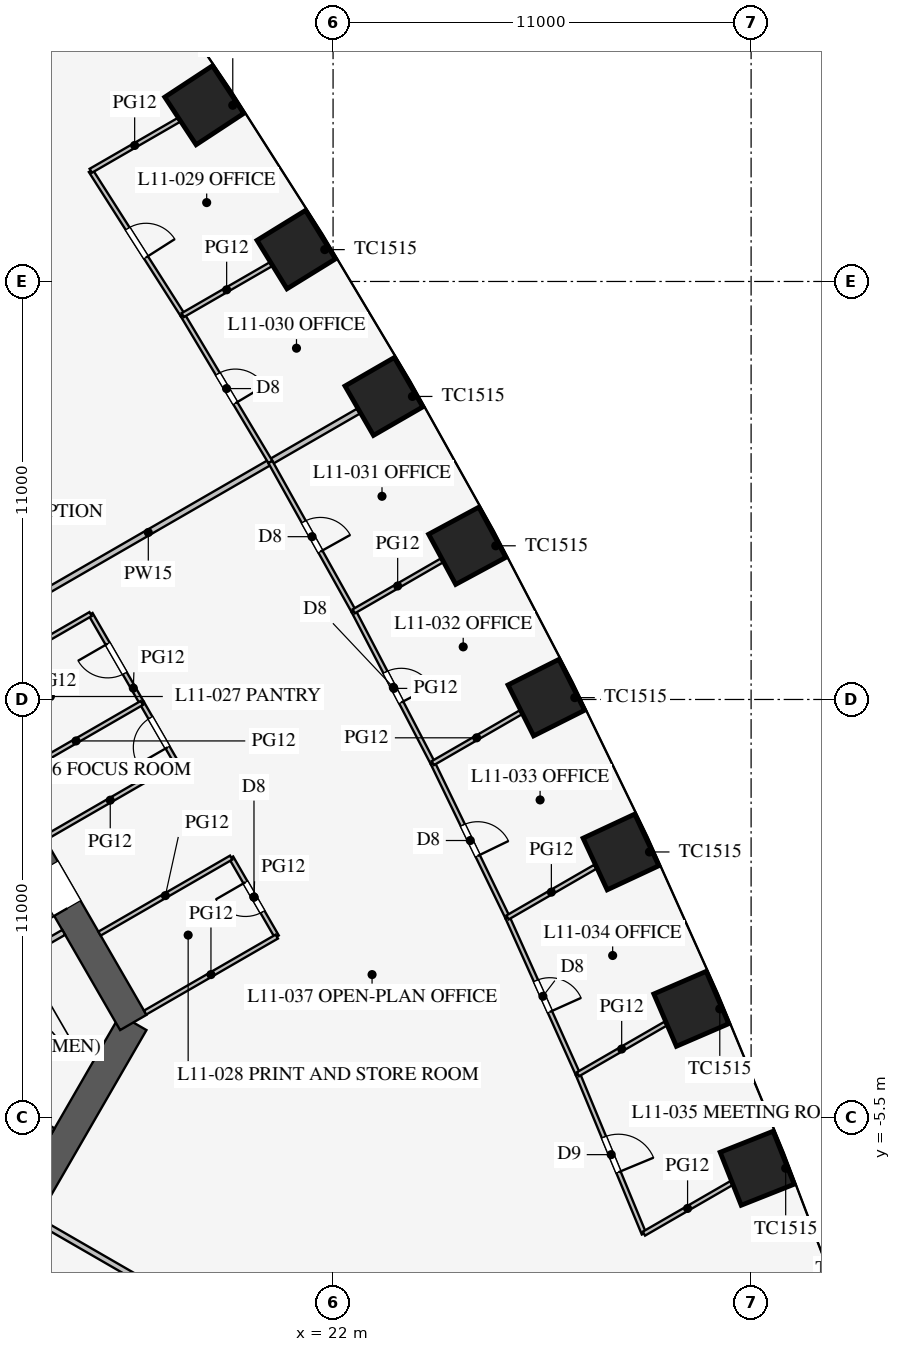
"""IFC4 building model, lengths in metres.
Left out: names, types, materials, properties, quantities, classifications, styles, units other than length and angle.
Written with IfcOpenShell. Run it as: python <this file> out.ifc"""

import sys

from ifc_helpers import new_model, si_unit, direction, frame, frame_2d, origin, origin_2d, place, context, subcontext, project, spatial, rectangle, extrude, element, fill, save


model = new_model("IFC4")
c1 = context("Model", 3, precision=1e-05, world=origin(), true_north=direction((0.0, 1.0)))
c2 = subcontext(c1, "Body", "Model", "MODEL_VIEW")
j1 = project(units=[si_unit("LENGTHUNIT", "METRE"), si_unit("PLANEANGLEUNIT", "RADIAN")], contexts=[c1])
p1 = place(None, origin())
s1 = spatial("IfcSite", under=j1, at=p1, CompositionType="ELEMENT")
p2 = place(p1, origin())
s2 = spatial("IfcBuilding", under=s1, at=p2, CompositionType="ELEMENT")
p3 = place(p2, frame((0.0, 0.0, 50.1)))
s3 = spatial("IfcBuildingStorey", under=s2, at=p3, CompositionType="ELEMENT", Elevation=50.1)
for number, where, z_axis, x_axis in (
    (1, (33.16, -6.836, 0.0), (0.0, 0.0, 1.0), (-0.369, 0.929, 0.0)),
    (2, (31.426, -2.641, 0.0), (0.0, 0.0, 1.0), (-0.396, 0.918, 0.0)),
    (3, (29.576, 1.487, 0.0), (0.0, 0.0, 1.0), (-0.423, 0.906, 0.0)),
    (4, (27.611, 5.549, 0.0), (0.0, 0.0, 1.0), (-0.449, 0.894, 0.0)),
    (5, (25.531, 9.544, 0.0), (0.0, 0.0, 1.0), (-0.475, 0.88, 0.0)),
    (6, (23.338, 13.474, 0.0), (0.0, 0.0, 1.0), (-0.5, 0.866, 0.0)),
    (7, (21.031, 17.339, 0.0), (0.0, 0.0, 1.0), (-0.525, 0.851, 0.0)),
    (8, (18.611, 21.137, 0.0), (0.0, 0.0, 1.0), (-0.549, 0.836, 0.0)),
):
    element("IfcColumn", number, at=place(p3, frame(where, z_axis=z_axis, x_axis=x_axis)), inside=s3, PredefinedType="COLUMN", context=c2, shape_type="SweptSolid", body=[
        extrude(rectangle(XDim=1.5, YDim=1.5, at=origin_2d()), origin(), (0.0, 0.0, 1.0), 4.2),
    ])
p4 = place(p3, frame((10.97, -13.0, 0.0), z_axis=(0.0, 0.0, 1.0), x_axis=(0.499995765644, 0.866027848477, 0.0)))
e9 = element("IfcWall", 9, at=p4, inside=s3, PredefinedType="SHEAR", context=c2, shape_type="SweptSolid", body=[
    extrude(rectangle(XDim=11.547, YDim=0.8, at=frame_2d((5.773, 0.0))), origin(), (0.0, 0.0, 1.0), 4.2),
])
p5 = place(p3, frame((16.743, -3.0, 0.0), z_axis=(0.0, 0.0, 1.0), x_axis=(-0.500002442456, 0.866023993627, 0.0)))
e10 = element("IfcWall", 10, at=p5, inside=s3, PredefinedType="SHEAR", context=c2, shape_type="SweptSolid", body=[
    extrude(rectangle(XDim=21.939, YDim=0.8, at=frame_2d((10.97, 0.0))), origin(), (0.0, 0.0, 1.0), 4.2),
])
p6 = place(p5, frame((17.27, 0.0, 0.0)))
e11 = element("IfcOpeningElement", 11, at=p6, cuts=e10, PredefinedType="OPENING", context=c2, shape_type="SweptSolid", body=[
    extrude(rectangle(XDim=1.2, YDim=2.1, at=frame_2d((0.6, 1.05))), frame((0.0, 0.41, 0.0), z_axis=(0.0, -1.0, 0.0), x_axis=(1.0, 0.0, 0.0)), (0.0, 0.0, 1.0), 0.82),
])
p7 = place(p5, frame((3.47, 0.0, 0.0)))
e12 = element("IfcOpeningElement", 12, at=p7, cuts=e10, PredefinedType="OPENING", context=c2, shape_type="SweptSolid", body=[
    extrude(rectangle(XDim=1.2, YDim=2.1, at=frame_2d((0.6, 1.05))), frame((0.0, 0.41, 0.0), z_axis=(0.0, -1.0, 0.0), x_axis=(1.0, 0.0, 0.0)), (0.0, 0.0, 1.0), 0.82),
])
p8 = place(p3, frame((6.663, -1.509, 0.0), z_axis=(0.0, 0.0, 1.0), x_axis=(0.866019375473, -0.500010441196, 0.0)))
e13 = element("IfcWall", 13, at=p8, inside=s3, PredefinedType="SHEAR", context=c2, shape_type="SweptSolid", body=[
    extrude(rectangle(XDim=9.075, YDim=0.6, at=frame_2d((4.538, 0.0))), origin(), (0.0, 0.0, 1.0), 4.2),
])
p9 = place(p3, frame((10.495, -3.178, 0.0), z_axis=(0.0, 0.0, 1.0), x_axis=(0.86602216432, 0.500005610874, 0.0)))
e14 = element("IfcWall", 14, at=p9, inside=s3, PredefinedType="PARTITIONING", context=c2, shape_type="SweptSolid", body=[
    extrude(rectangle(XDim=5.1, YDim=0.15, at=frame_2d((2.55, 0.0))), origin(), (0.0, 0.0, 1.0), 4.0),
])
p10 = place(p9, frame((2.6, 0.0, 0.0)))
e15 = element("IfcOpeningElement", 15, at=p10, cuts=e14, PredefinedType="OPENING", context=c2, shape_type="SweptSolid", body=[
    extrude(rectangle(XDim=0.9, YDim=2.1, at=frame_2d((0.45, 1.05))), frame((0.0, 0.085, 0.0), z_axis=(0.0, -1.0, 0.0), x_axis=(1.0, 0.0, 0.0)), (0.0, 0.0, 1.0), 0.17),
])
p11 = place(p3, frame((14.203, -8.2, 0.0), z_axis=(0.0, 0.0, 1.0), x_axis=(0.866024965723, -0.500000758745, 0.0)))
e16 = element("IfcWall", 16, at=p11, inside=s3, PredefinedType="PARTITIONING", context=c2, shape_type="SweptSolid", body=[
    extrude(rectangle(XDim=18.25, YDim=0.15, at=frame_2d((9.125, 0.0))), origin(), (0.0, 0.0, 1.0), 2.3),
])
p12 = place(p3, frame((11.613, 6.705, 0.0), z_axis=(0.0, 0.0, 1.0), x_axis=(0.86602785495, 0.499995754432, 0.0)))
e17 = element("IfcWall", 17, at=p12, inside=s3, PredefinedType="PARTITIONING", context=c2, shape_type="SweptSolid", body=[
    extrude(rectangle(XDim=12.759, YDim=0.15, at=frame_2d((6.379, 0.0))), origin(), (0.0, 0.0, 1.0), 3.2),
])
p13 = place(p3, frame((20.519, -0.74, 0.0), z_axis=(0.0, 0.0, 1.0), x_axis=(-0.499957262057, 0.866050077142, 0.0)))
e18 = element("IfcWall", 18, at=p13, inside=s3, PredefinedType="PARTITIONING", context=c2, shape_type="SweptSolid", body=[
    extrude(rectangle(XDim=2.4, YDim=0.12, at=frame_2d((1.2, 0.0))), origin(), (0.0, 0.0, 1.0), 2.9),
])
p14 = place(p13, frame((0.75, 0.0, 0.15)))
e19 = element("IfcOpeningElement", 19, at=p14, cuts=e18, PredefinedType="OPENING", context=c2, shape_type="SweptSolid", body=[
    extrude(rectangle(XDim=0.9, YDim=2.1, at=frame_2d((0.45, 1.05))), frame((0.0, 0.07, 0.0), z_axis=(0.0, -1.0, 0.0), x_axis=(1.0, 0.0, 0.0)), (0.0, 0.0, 1.0), 0.14),
])
p15 = place(p3, frame((16.969, 5.409, 0.0), z_axis=(0.0, 0.0, 1.0), x_axis=(-0.499980770555, 0.866036505625, 0.0)))
e20 = element("IfcWall", 20, at=p15, inside=s3, PredefinedType="PARTITIONING", context=c2, shape_type="SweptSolid", body=[
    extrude(rectangle(XDim=2.7, YDim=0.12, at=frame_2d((1.35, 0.0))), origin(), (0.0, 0.0, 1.0), 2.9),
])
p16 = place(p15, frame((0.9, 0.0, 0.15)))
e21 = element("IfcOpeningElement", 21, at=p16, cuts=e20, PredefinedType="OPENING", context=c2, shape_type="SweptSolid", body=[
    extrude(rectangle(XDim=0.9, YDim=2.1, at=frame_2d((0.45, 1.05))), frame((0.0, 0.07, 0.0), z_axis=(0.0, -1.0, 0.0), x_axis=(1.0, 0.0, 0.0)), (0.0, 0.0, 1.0), 0.14),
])
p17 = place(p3, frame((17.869, 3.85, 0.0), z_axis=(0.0, 0.0, 1.0), x_axis=(-0.500062916607, 0.865989075817, 0.0)))
e22 = element("IfcWall", 22, at=p17, inside=s3, PredefinedType="PARTITIONING", context=c2, shape_type="SweptSolid", body=[
    extrude(rectangle(XDim=1.8, YDim=0.12, at=frame_2d((0.9, 0.0))), origin(), (0.0, 0.0, 1.0), 2.9),
])
p18 = place(p17, frame((0.45, 0.0, 0.15)))
e23 = element("IfcOpeningElement", 23, at=p18, cuts=e22, PredefinedType="OPENING", context=c2, shape_type="SweptSolid", body=[
    extrude(rectangle(XDim=0.9, YDim=2.1, at=frame_2d((0.45, 1.05))), frame((0.0, 0.07, 0.0), z_axis=(0.0, -1.0, 0.0), x_axis=(1.0, 0.0, 0.0)), (0.0, 0.0, 1.0), 0.14),
])
for number, where, z_axis, x_axis in (
    (24, (12.155, 5.747, 0.0), (0.0, 0.0, 1.0), (0.866, 0.5, 0.0)),
    (25, (17.055, -2.74, 0.0), (0.0, 0.0, 1.0), (0.866, 0.5, 0.0)),
    (26, (13.505, 3.409, 0.0), (0.0, 0.0, 1.0), (0.866, 0.5, 0.0)),
    (27, (14.405, 1.85, 0.0), (0.0, 0.0, 1.0), (0.866, 0.5, 0.0)),
    (28, (15.855, -0.661, 0.0), (0.0, 0.0, 1.0), (0.866, 0.5, 0.0)),
):
    element("IfcWall", number, at=place(p3, frame(where, z_axis=z_axis, x_axis=x_axis)), inside=s3, PredefinedType="PARTITIONING", context=c2, shape_type="SweptSolid", body=[
        extrude(rectangle(XDim=4.0, YDim=0.12, at=frame_2d((2.0, 0.0))), origin(), (0.0, 0.0, 1.0), 2.9),
    ])
p19 = place(p3, frame((20.351, 11.749, 0.0), z_axis=(0.0, 0.0, 1.0), x_axis=(-0.51252396108, 0.858672923364, 0.0)))
e29 = element("IfcWall", 29, at=p19, inside=s3, PredefinedType="PARTITIONING", context=c2, shape_type="SweptSolid", body=[
    extrude(rectangle(XDim=4.5, YDim=0.12, at=frame_2d((2.25, 0.0))), origin(), (0.0, 0.0, 1.0), 2.9),
])
p20 = place(p19, frame((1.8, 0.0, 0.15)))
e30 = element("IfcOpeningElement", 30, at=p20, cuts=e29, PredefinedType="OPENING", context=c2, shape_type="SweptSolid", body=[
    extrude(rectangle(XDim=0.9, YDim=2.1, at=frame_2d((0.45, 1.05))), frame((0.0, 0.07, 0.0), z_axis=(0.0, -1.0, 0.0), x_axis=(1.0, 0.0, 0.0)), (0.0, 0.0, 1.0), 0.14),
])
p21 = place(p3, frame((18.044, 15.614, 0.0), z_axis=(0.0, 0.0, 1.0), x_axis=(-0.537243691336, 0.843427066272, 0.0)))
e31 = element("IfcWall", 31, at=p21, inside=s3, PredefinedType="PARTITIONING", context=c2, shape_type="SweptSolid", body=[
    extrude(rectangle(XDim=4.504, YDim=0.12, at=frame_2d((2.252, 0.0))), origin(), (0.0, 0.0, 1.0), 2.9),
])
p22 = place(p21, frame((1.8, 0.0, 0.15)))
e32 = element("IfcOpeningElement", 32, at=p22, cuts=e31, PredefinedType="OPENING", context=c2, shape_type="SweptSolid", body=[
    extrude(rectangle(XDim=0.9, YDim=2.1, at=frame_2d((0.45, 1.05))), frame((0.0, 0.07, 0.0), z_axis=(0.0, -1.0, 0.0), x_axis=(1.0, 0.0, 0.0)), (0.0, 0.0, 1.0), 0.14),
])
p23 = place(p3, frame((26.591, -0.236, 0.0), z_axis=(0.0, 0.0, 1.0), x_axis=(-0.435857917556, 0.900015486369, 0.0)))
e33 = element("IfcWall", 33, at=p23, inside=s3, PredefinedType="PARTITIONING", context=c2, shape_type="SweptSolid", body=[
    extrude(rectangle(XDim=4.512, YDim=0.12, at=frame_2d((2.256, 0.0))), origin(), (0.0, 0.0, 1.0), 2.9),
])
p24 = place(p23, frame((1.8, 0.0, 0.15)))
e34 = element("IfcOpeningElement", 34, at=p24, cuts=e33, PredefinedType="OPENING", context=c2, shape_type="SweptSolid", body=[
    extrude(rectangle(XDim=0.9, YDim=2.1, at=frame_2d((0.45, 1.05))), frame((0.0, 0.07, 0.0), z_axis=(0.0, -1.0, 0.0), x_axis=(1.0, 0.0, 0.0)), (0.0, 0.0, 1.0), 0.14),
])
p25 = place(p3, frame((28.443, -4.363, 0.0), z_axis=(0.0, 0.0, 1.0), x_axis=(-0.409495979977, 0.912311921649, 0.0)))
e35 = element("IfcWall", 35, at=p25, inside=s3, PredefinedType="PARTITIONING", context=c2, shape_type="SweptSolid", body=[
    extrude(rectangle(XDim=4.523, YDim=0.12, at=frame_2d((2.262, 0.0))), origin(), (0.0, 0.0, 1.0), 2.9),
])
p26 = place(p25, frame((1.8, 0.0, 0.15)))
e36 = element("IfcOpeningElement", 36, at=p26, cuts=e35, PredefinedType="OPENING", context=c2, shape_type="SweptSolid", body=[
    extrude(rectangle(XDim=0.9, YDim=2.1, at=frame_2d((0.45, 1.05))), frame((0.0, 0.07, 0.0), z_axis=(0.0, -1.0, 0.0), x_axis=(1.0, 0.0, 0.0)), (0.0, 0.0, 1.0), 0.14),
])
p27 = place(p3, frame((30.179, -8.557, 0.0), z_axis=(0.0, 0.0, 1.0), x_axis=(-0.382594071331, 0.923916542001, 0.0)))
e37 = element("IfcWall", 37, at=p27, inside=s3, PredefinedType="PARTITIONING", context=c2, shape_type="SweptSolid", body=[
    extrude(rectangle(XDim=4.539, YDim=0.12, at=frame_2d((2.27, 0.0))), origin(), (0.0, 0.0, 1.0), 2.9),
])
p28 = place(p27, frame((1.75, 0.0, 0.15)))
e38 = element("IfcOpeningElement", 38, at=p28, cuts=e37, PredefinedType="OPENING", context=c2, shape_type="SweptSolid", body=[
    extrude(rectangle(XDim=1.0, YDim=2.1, at=frame_2d((0.5, 1.05))), frame((0.0, 0.07, 0.0), z_axis=(0.0, -1.0, 0.0), x_axis=(1.0, 0.0, 0.0)), (0.0, 0.0, 1.0), 0.14),
])
p29 = place(p3, frame((22.544, 7.82, 0.0), z_axis=(0.0, 0.0, 1.0), x_axis=(-0.487373854787, 0.873193406795, 0.0)))
e39 = element("IfcWall", 39, at=p29, inside=s3, PredefinedType="PARTITIONING", context=c2, shape_type="SweptSolid", body=[
    extrude(rectangle(XDim=4.5, YDim=0.12, at=frame_2d((2.25, 0.0))), origin(), (0.0, 0.0, 1.0), 2.9),
])
p30 = place(p29, frame((1.8, 0.0, 0.15)))
e40 = element("IfcOpeningElement", 40, at=p30, cuts=e39, PredefinedType="OPENING", context=c2, shape_type="SweptSolid", body=[
    extrude(rectangle(XDim=0.9, YDim=2.1, at=frame_2d((0.45, 1.05))), frame((0.0, 0.07, 0.0), z_axis=(0.0, -1.0, 0.0), x_axis=(1.0, 0.0, 0.0)), (0.0, 0.0, 1.0), 0.14),
])
p31 = place(p3, frame((24.624, 3.824, 0.0), z_axis=(0.0, 0.0, 1.0), x_axis=(-0.461810056307, 0.886978845235, 0.0)))
e41 = element("IfcWall", 41, at=p31, inside=s3, PredefinedType="PARTITIONING", context=c2, shape_type="SweptSolid", body=[
    extrude(rectangle(XDim=4.504, YDim=0.12, at=frame_2d((2.252, 0.0))), origin(), (0.0, 0.0, 1.0), 2.9),
])
p32 = place(p31, frame((1.8, 0.0, 0.15)))
e42 = element("IfcOpeningElement", 42, at=p32, cuts=e41, PredefinedType="OPENING", context=c2, shape_type="SweptSolid", body=[
    extrude(rectangle(XDim=0.9, YDim=2.1, at=frame_2d((0.45, 1.05))), frame((0.0, 0.07, 0.0), z_axis=(0.0, -1.0, 0.0), x_axis=(1.0, 0.0, 0.0)), (0.0, 0.0, 1.0), 0.14),
])
p33 = place(p3, frame((18.044, 15.614, 0.0), z_axis=(0.0, 0.0, 1.0), x_axis=(0.866022619654, 0.500004822225, 0.0)))
e43 = element("IfcWall", 43, at=p33, inside=s3, PredefinedType="PARTITIONING", context=c2, shape_type="SweptSolid", body=[
    extrude(rectangle(XDim=2.669, YDim=0.12, at=frame_2d((1.335, 0.0))), origin(), (0.0, 0.0, 1.0), 2.9),
])
p34 = place(p3, frame((15.624, 19.413, 0.0), z_axis=(0.0, 0.0, 1.0), x_axis=(0.866020974757, 0.500007671222, 0.0)))
e44 = element("IfcWall", 44, at=p34, inside=s3, PredefinedType="PARTITIONING", context=c2, shape_type="SweptSolid", body=[
    extrude(rectangle(XDim=2.667, YDim=0.12, at=frame_2d((1.334, 0.0))), origin(), (0.0, 0.0, 1.0), 2.9),
])
p35 = place(p3, frame((26.591, -0.236, 0.0), z_axis=(0.0, 0.0, 1.0), x_axis=(0.866023818221, 0.500002746266, 0.0)))
e45 = element("IfcWall", 45, at=p35, inside=s3, PredefinedType="PARTITIONING", context=c2, shape_type="SweptSolid", body=[
    extrude(rectangle(XDim=2.664, YDim=0.12, at=frame_2d((1.332, 0.0))), origin(), (0.0, 0.0, 1.0), 2.9),
])
p36 = place(p3, frame((28.443, -4.363, 0.0), z_axis=(0.0, 0.0, 1.0), x_axis=(0.866031171652, 0.499990009627, 0.0)))
e46 = element("IfcWall", 46, at=p36, inside=s3, PredefinedType="PARTITIONING", context=c2, shape_type="SweptSolid", body=[
    extrude(rectangle(XDim=2.659, YDim=0.12, at=frame_2d((1.33, 0.0))), origin(), (0.0, 0.0, 1.0), 2.9),
])
p37 = place(p3, frame((30.179, -8.557, 0.0), z_axis=(0.0, 0.0, 1.0), x_axis=(0.866026229868, 0.499998569178, 0.0)))
e47 = element("IfcWall", 47, at=p37, inside=s3, PredefinedType="PARTITIONING", context=c2, shape_type="SweptSolid", body=[
    extrude(rectangle(XDim=2.653, YDim=0.12, at=frame_2d((1.327, 0.0))), origin(), (0.0, 0.0, 1.0), 2.9),
])
p38 = place(p3, frame((22.544, 7.82, 0.0), z_axis=(0.0, 0.0, 1.0), x_axis=(0.866022619654, 0.500004822225, 0.0)))
e48 = element("IfcWall", 48, at=p38, inside=s3, PredefinedType="PARTITIONING", context=c2, shape_type="SweptSolid", body=[
    extrude(rectangle(XDim=2.669, YDim=0.12, at=frame_2d((1.335, 0.0))), origin(), (0.0, 0.0, 1.0), 2.9),
])
p39 = place(p3, frame((24.624, 3.824, 0.0), z_axis=(0.0, 0.0, 1.0), x_axis=(0.866020974757, 0.500007671222, 0.0)))
e49 = element("IfcWall", 49, at=p39, inside=s3, PredefinedType="PARTITIONING", context=c2, shape_type="SweptSolid", body=[
    extrude(rectangle(XDim=2.667, YDim=0.12, at=frame_2d((1.334, 0.0))), origin(), (0.0, 0.0, 1.0), 2.9),
])
p40 = place(p7, origin())
e50 = element("IfcDoor", 50, at=p40, inside=s3, OperationType="SINGLE_SWING_LEFT", PredefinedType="DOOR", context=c2, shape_type="SweptSolid", body=[
    extrude(rectangle(XDim=1.2, YDim=2.1, at=frame_2d((0.6, 1.05))), frame((0.0, 0.025, 0.0), z_axis=(0.0, -1.0, 0.0), x_axis=(1.0, 0.0, 0.0)), (0.0, 0.0, 1.0), 0.05),
])
fill(e12, e50)
p41 = place(p18, origin())
e51 = element("IfcDoor", 51, at=p41, inside=s3, OperationType="SINGLE_SWING_LEFT", PredefinedType="DOOR", context=c2, shape_type="SweptSolid", body=[
    extrude(rectangle(XDim=0.9, YDim=2.1, at=frame_2d((0.45, 1.05))), frame((0.0, 0.025, 0.0), z_axis=(0.0, -1.0, 0.0), x_axis=(1.0, 0.0, 0.0)), (0.0, 0.0, 1.0), 0.05),
])
fill(e23, e51)
p42 = place(p16, origin())
e52 = element("IfcDoor", 52, at=p42, inside=s3, OperationType="SINGLE_SWING_RIGHT", PredefinedType="DOOR", context=c2, shape_type="SweptSolid", body=[
    extrude(rectangle(XDim=0.9, YDim=2.1, at=frame_2d((0.45, 1.05))), frame((0.0, 0.025, 0.0), z_axis=(0.0, -1.0, 0.0), x_axis=(1.0, 0.0, 0.0)), (0.0, 0.0, 1.0), 0.05),
])
fill(e21, e52)
p43 = place(p14, origin())
e53 = element("IfcDoor", 53, at=p43, inside=s3, OperationType="SINGLE_SWING_RIGHT", PredefinedType="DOOR", context=c2, shape_type="SweptSolid", body=[
    extrude(rectangle(XDim=0.9, YDim=2.1, at=frame_2d((0.45, 1.05))), frame((0.0, 0.025, 0.0), z_axis=(0.0, -1.0, 0.0), x_axis=(1.0, 0.0, 0.0)), (0.0, 0.0, 1.0), 0.05),
])
fill(e19, e53)
p44 = place(p22, frame((0.9, 0.0, 0.0), z_axis=(0.0, 0.0, 1.0), x_axis=(-1.0, 0.0, 0.0)))
e54 = element("IfcDoor", 54, at=p44, inside=s3, OperationType="SINGLE_SWING_RIGHT", PredefinedType="DOOR", context=c2, shape_type="SweptSolid", body=[
    extrude(rectangle(XDim=0.9, YDim=2.1, at=frame_2d((0.45, 1.05))), frame((0.0, 0.025, 0.0), z_axis=(0.0, -1.0, 0.0), x_axis=(1.0, 0.0, 0.0)), (0.0, 0.0, 1.0), 0.05),
])
fill(e32, e54)
p45 = place(p20, frame((0.9, 0.0, 0.0), z_axis=(0.0, 0.0, 1.0), x_axis=(-1.0, 0.0, 0.0)))
e55 = element("IfcDoor", 55, at=p45, inside=s3, OperationType="SINGLE_SWING_RIGHT", PredefinedType="DOOR", context=c2, shape_type="SweptSolid", body=[
    extrude(rectangle(XDim=0.9, YDim=2.1, at=frame_2d((0.45, 1.05))), frame((0.0, 0.025, 0.0), z_axis=(0.0, -1.0, 0.0), x_axis=(1.0, 0.0, 0.0)), (0.0, 0.0, 1.0), 0.05),
])
fill(e30, e55)
p46 = place(p30, frame((0.9, 0.0, 0.0), z_axis=(0.0, 0.0, 1.0), x_axis=(-1.0, 0.0, 0.0)))
e56 = element("IfcDoor", 56, at=p46, inside=s3, OperationType="SINGLE_SWING_RIGHT", PredefinedType="DOOR", context=c2, shape_type="SweptSolid", body=[
    extrude(rectangle(XDim=0.9, YDim=2.1, at=frame_2d((0.45, 1.05))), frame((0.0, 0.025, 0.0), z_axis=(0.0, -1.0, 0.0), x_axis=(1.0, 0.0, 0.0)), (0.0, 0.0, 1.0), 0.05),
])
fill(e40, e56)
p47 = place(p32, frame((0.9, 0.0, 0.0), z_axis=(0.0, 0.0, 1.0), x_axis=(-1.0, 0.0, 0.0)))
e57 = element("IfcDoor", 57, at=p47, inside=s3, OperationType="SINGLE_SWING_RIGHT", PredefinedType="DOOR", context=c2, shape_type="SweptSolid", body=[
    extrude(rectangle(XDim=0.9, YDim=2.1, at=frame_2d((0.45, 1.05))), frame((0.0, 0.025, 0.0), z_axis=(0.0, -1.0, 0.0), x_axis=(1.0, 0.0, 0.0)), (0.0, 0.0, 1.0), 0.05),
])
fill(e42, e57)
p48 = place(p24, frame((0.9, 0.0, 0.0), z_axis=(0.0, 0.0, 1.0), x_axis=(-1.0, 0.0, 0.0)))
e58 = element("IfcDoor", 58, at=p48, inside=s3, OperationType="SINGLE_SWING_RIGHT", PredefinedType="DOOR", context=c2, shape_type="SweptSolid", body=[
    extrude(rectangle(XDim=0.9, YDim=2.1, at=frame_2d((0.45, 1.05))), frame((0.0, 0.025, 0.0), z_axis=(0.0, -1.0, 0.0), x_axis=(1.0, 0.0, 0.0)), (0.0, 0.0, 1.0), 0.05),
])
fill(e34, e58)
p49 = place(p26, frame((0.9, 0.0, 0.0), z_axis=(0.0, 0.0, 1.0), x_axis=(-1.0, 0.0, 0.0)))
e59 = element("IfcDoor", 59, at=p49, inside=s3, OperationType="SINGLE_SWING_RIGHT", PredefinedType="DOOR", context=c2, shape_type="SweptSolid", body=[
    extrude(rectangle(XDim=0.9, YDim=2.1, at=frame_2d((0.45, 1.05))), frame((0.0, 0.025, 0.0), z_axis=(0.0, -1.0, 0.0), x_axis=(1.0, 0.0, 0.0)), (0.0, 0.0, 1.0), 0.05),
])
fill(e36, e59)
p50 = place(p28, frame((1.0, 0.0, 0.0), z_axis=(0.0, 0.0, 1.0), x_axis=(-1.0, 0.0, 0.0)))
e60 = element("IfcDoor", 60, at=p50, inside=s3, OperationType="SINGLE_SWING_RIGHT", PredefinedType="DOOR", context=c2, shape_type="SweptSolid", body=[
    extrude(rectangle(XDim=1.0, YDim=2.1, at=frame_2d((0.5, 1.05))), frame((0.0, 0.025, 0.0), z_axis=(0.0, -1.0, 0.0), x_axis=(1.0, 0.0, 0.0)), (0.0, 0.0, 1.0), 0.05),
])
fill(e38, e60)
save(model, sys.argv[1])
